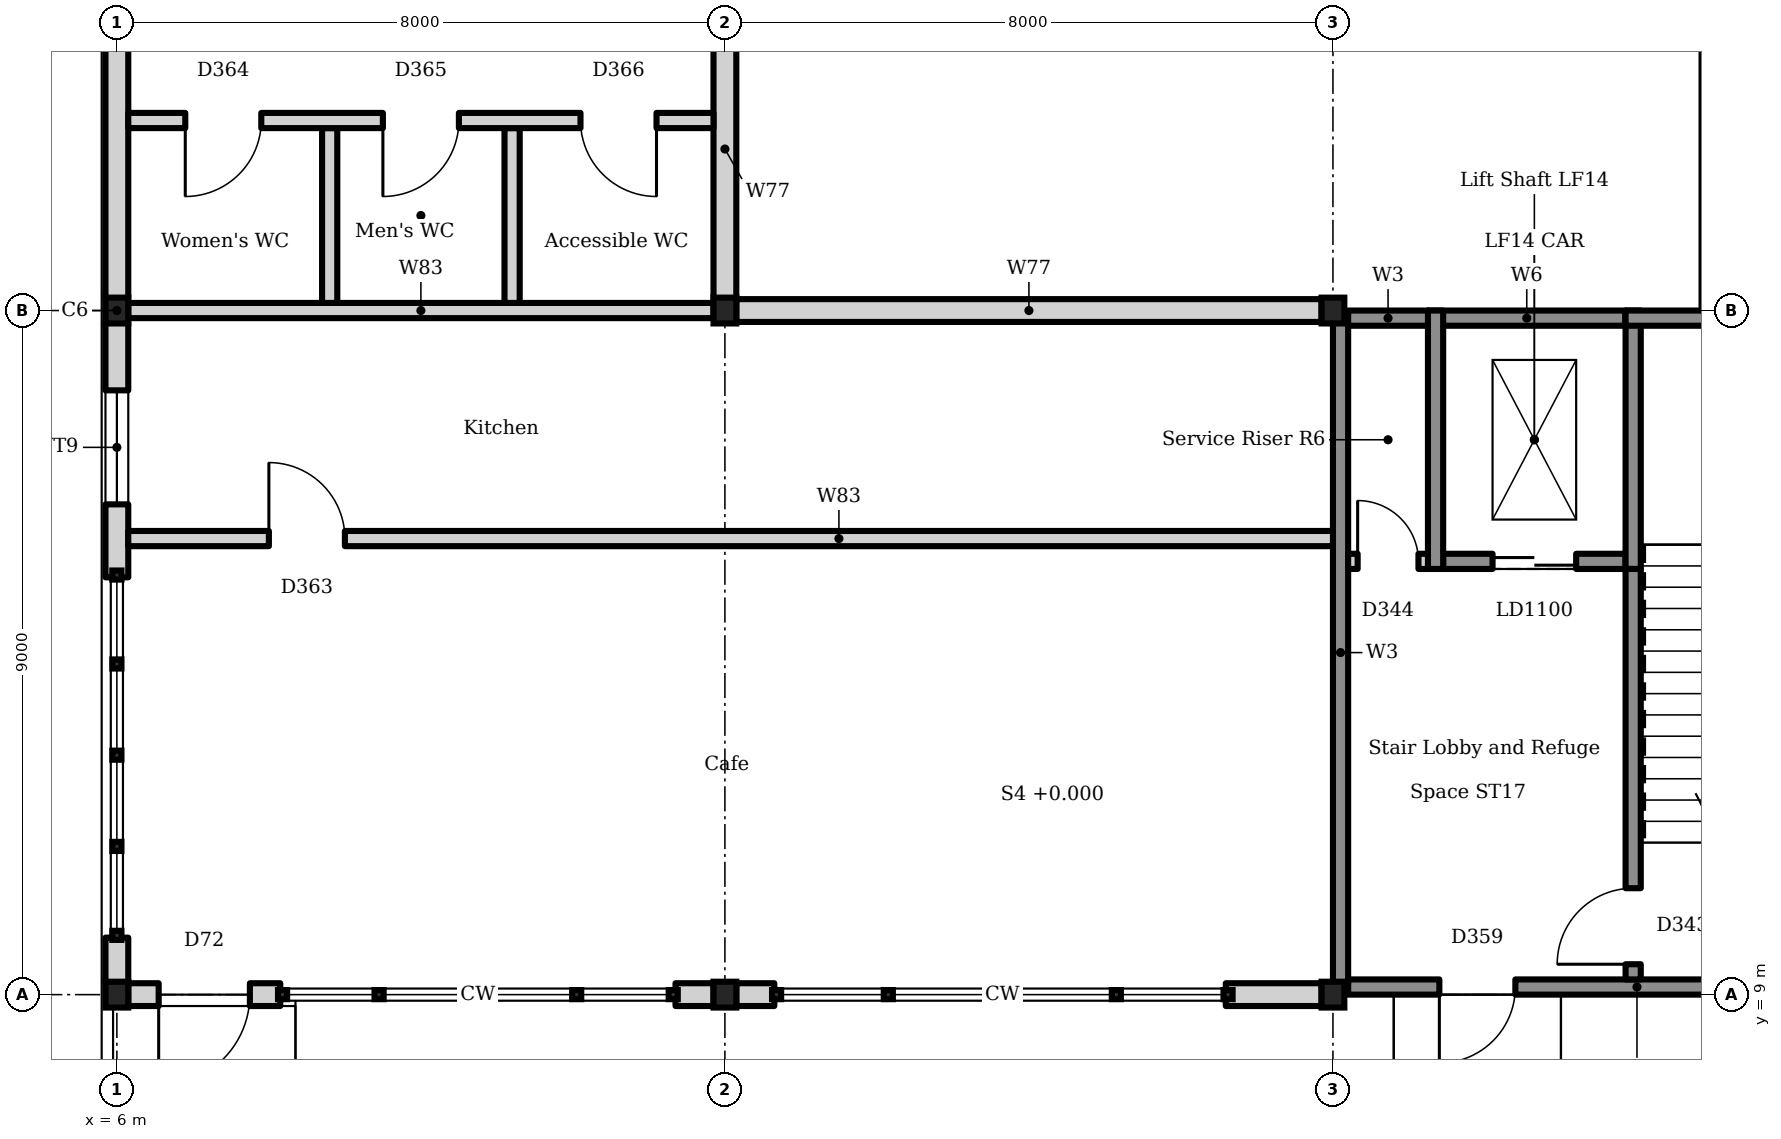
"""IFC4 building model, lengths in metres.
Left out: names, types, materials, properties, quantities, classifications, styles, units other than length and angle.
Written with IfcOpenShell. Run it as: python <this file> out.ifc"""

import sys

from ifc_helpers import new_model, si_unit, direction, frame, frame_2d, origin, origin_2d, place, context, subcontext, project, spatial, rectangle, i_section, extrude, element, fill, save


model = new_model("IFC4")
c1 = context("Model", 3, precision=1e-05, world=origin(), true_north=direction((0.0, 1.0)))
c2 = subcontext(c1, "Body", "Model", "MODEL_VIEW")
j1 = project(units=[si_unit("LENGTHUNIT", "METRE"), si_unit("PLANEANGLEUNIT", "RADIAN")], contexts=[c1])
p1 = place(None, origin())
s1 = spatial("IfcSite", under=j1, at=p1, CompositionType="ELEMENT")
p2 = place(p1, origin())
s2 = spatial("IfcBuilding", under=s1, at=p2, CompositionType="ELEMENT")
p3 = place(p2, origin())
s3 = spatial("IfcBuildingStorey", under=s2, at=p3, CompositionType="ELEMENT", Elevation=0.0)
p4 = place(p3, frame((23.25, 17.9, -1.1), z_axis=(0.0, 0.0, 1.0), x_axis=(1.0, 0.0, 0.0)))
e1 = element("IfcWall", 1, at=p4, inside=s3, PredefinedType="SOLIDWALL", context=c2, shape_type="SweptSolid", body=[
    extrude(rectangle(XDim=2.6, YDim=0.2, at=frame_2d((1.3, 0.0))), origin(), (0.0, 0.0, 1.0), 6.5),
])
p5 = place(p3, frame((23.45, 14.7, -1.1), z_axis=(0.0, 0.0, 1.0), x_axis=(1.0, 0.0, 0.0)))
e2 = element("IfcWall", 2, at=p5, inside=s3, PredefinedType="SOLIDWALL", context=c2, shape_type="SweptSolid", body=[
    extrude(rectangle(XDim=2.4, YDim=0.2, at=frame_2d((1.2, 0.0))), origin(), (0.0, 0.0, 1.0), 6.5),
])
p6 = place(p5, frame((0.65, 0.0, 1.1)))
e3 = element("IfcOpeningElement", 3, at=p6, cuts=e2, PredefinedType="OPENING", context=c2, shape_type="SweptSolid", body=[
    extrude(rectangle(XDim=1.1, YDim=2.1, at=frame_2d((0.55, 1.05))), frame((0.0, 0.11, 0.0), z_axis=(0.0, -1.0, 0.0), x_axis=(1.0, 0.0, 0.0)), (0.0, 0.0, 1.0), 0.22),
])
for number, where, z_axis, x_axis in (
    (4, (23.35, 14.6, -1.1), (0.0, 0.0, 1.0), (0.0, 1.0, 0.0)),
    (5, (25.95, 14.6, -1.1), (0.0, 0.0, 1.0), (0.0, 1.0, 0.0)),
):
    element("IfcWall", number, at=place(p3, frame(where, z_axis=z_axis, x_axis=x_axis)), inside=s3, PredefinedType="SOLIDWALL", context=c2, shape_type="SweptSolid", body=[
        extrude(rectangle(XDim=3.4, YDim=0.2, at=frame_2d((1.7, 0.0))), origin(), (0.0, 0.0, 1.0), 6.5),
    ])
for number, where, z_axis, x_axis in (
    (6, (6.0, 9.0, 0.0), (0.0, 0.0, 1.0), (1.0, 0.0, 0.0)),
    (7, (6.0, 18.0, 0.0), (0.0, 0.0, 1.0), (1.0, 0.0, 0.0)),
    (8, (14.0, 9.0, 0.0), (0.0, 0.0, 1.0), (1.0, 0.0, 0.0)),
    (9, (14.0, 18.0, 0.0), (0.0, 0.0, 1.0), (1.0, 0.0, 0.0)),
    (10, (22.0, 9.0, 0.0), (0.0, 0.0, 1.0), (1.0, 0.0, 0.0)),
    (11, (22.0, 18.0, 0.0), (0.0, 0.0, 1.0), (1.0, 0.0, 0.0)),
):
    element("IfcColumn", number, at=place(p3, frame(where, z_axis=z_axis, x_axis=x_axis)), inside=s3, PredefinedType="COLUMN", context=c2, shape_type="SweptSolid", body=[
        extrude(i_section(OverallWidth=0.3, OverallDepth=0.34, WebThickness=0.012, FlangeThickness=0.021, FilletRadius=0.027, at=origin_2d()), origin(), (0.0, 0.0, 1.0), 5.4),
    ])
p7 = place(p3, frame((6.15, 9.0, 0.0), z_axis=(0.0, 0.0, 1.0), x_axis=(1.0, 0.0, 0.0)))
e12 = element("IfcWall", 12, at=p7, inside=s3, PredefinedType="SOLIDWALL", context=c2, shape_type="SweptSolid", body=[
    extrude(rectangle(XDim=2.0, YDim=0.3, at=frame_2d((1.0, 0.0))), origin(), (0.0, 0.0, 1.0), 4.72),
])
p8 = place(p7, frame((0.4, 0.0, 0.0)))
e13 = element("IfcOpeningElement", 13, at=p8, cuts=e12, PredefinedType="OPENING", context=c2, shape_type="SweptSolid", body=[
    extrude(rectangle(XDim=1.2, YDim=2.4, at=frame_2d((0.6, 1.2))), frame((0.0, 0.16, 0.0), z_axis=(0.0, -1.0, 0.0), x_axis=(1.0, 0.0, 0.0)), (0.0, 0.0, 1.0), 0.32),
])
for number, where, z_axis, x_axis in (
    (14, (13.35, 9.0, 0.0), (0.0, 0.0, 1.0), (1.0, 0.0, 0.0)),
    (15, (14.15, 9.0, 0.0), (0.0, 0.0, 1.0), (1.0, 0.0, 0.0)),
):
    element("IfcWall", number, at=place(p3, frame(where, z_axis=z_axis, x_axis=x_axis)), inside=s3, PredefinedType="SOLIDWALL", context=c2, shape_type="SweptSolid", body=[
        extrude(rectangle(XDim=0.5, YDim=0.3, at=frame_2d((0.25, 0.0))), origin(), (0.0, 0.0, 1.0), 4.72),
    ])
p9 = place(p3, frame((20.59, 9.0, 0.0), z_axis=(0.0, 0.0, 1.0), x_axis=(1.0, 0.0, 0.0)))
e16 = element("IfcWall", 16, at=p9, inside=s3, PredefinedType="SOLIDWALL", context=c2, shape_type="SweptSolid", body=[
    extrude(rectangle(XDim=1.26, YDim=0.3, at=frame_2d((0.63, 0.0))), origin(), (0.0, 0.0, 1.0), 4.72),
])
p10 = place(p3, frame((6.0, 9.15, 0.0), z_axis=(0.0, 0.0, 1.0), x_axis=(0.0, 1.0, 0.0)))
e17 = element("IfcWall", 17, at=p10, inside=s3, PredefinedType="SOLIDWALL", context=c2, shape_type="SweptSolid", body=[
    extrude(rectangle(XDim=0.6, YDim=0.3, at=frame_2d((0.3, 0.0))), origin(), (0.0, 0.0, 1.0), 4.72),
])
p11 = place(p3, frame((6.0, 14.49, 0.0), z_axis=(0.0, 0.0, 1.0), x_axis=(0.0, 1.0, 0.0)))
e18 = element("IfcWall", 18, at=p11, inside=s3, PredefinedType="SOLIDWALL", context=c2, shape_type="SweptSolid", body=[
    extrude(rectangle(XDim=3.36, YDim=0.3, at=frame_2d((1.68, 0.0))), origin(), (0.0, 0.0, 1.0), 4.72),
])
p12 = place(p11, frame((0.96, 0.0, 0.9)))
e19 = element("IfcOpeningElement", 19, at=p12, cuts=e18, PredefinedType="OPENING", context=c2, shape_type="SweptSolid", body=[
    extrude(rectangle(XDim=1.5, YDim=2.8, at=frame_2d((0.75, 1.4))), frame((0.0, 0.16, 0.0), z_axis=(0.0, -1.0, 0.0), x_axis=(1.0, 0.0, 0.0)), (0.0, 0.0, 1.0), 0.32),
])
p13 = place(p3, frame((6.0, 18.15, 0.0), z_axis=(0.0, 0.0, 1.0), x_axis=(0.0, 1.0, 0.0)))
e20 = element("IfcWall", 20, at=p13, inside=s3, PredefinedType="SOLIDWALL", context=c2, shape_type="SweptSolid", body=[
    extrude(rectangle(XDim=8.7, YDim=0.3, at=frame_2d((4.35, 0.0))), origin(), (0.0, 0.0, 1.0), 4.72),
])
p14 = place(p13, frame((3.45, 0.0, 0.0)))
e21 = element("IfcOpeningElement", 21, at=p14, cuts=e20, PredefinedType="OPENING", context=c2, shape_type="SweptSolid", body=[
    extrude(rectangle(XDim=1.8, YDim=2.4, at=frame_2d((0.9, 1.2))), frame((0.0, 0.16, 0.0), z_axis=(0.0, -1.0, 0.0), x_axis=(1.0, 0.0, 0.0)), (0.0, 0.0, 1.0), 0.32),
])
p15 = place(p13, frame((6.3, 0.0, 0.9)))
e22 = element("IfcOpeningElement", 22, at=p15, cuts=e20, PredefinedType="OPENING", context=c2, shape_type="SweptSolid", body=[
    extrude(rectangle(XDim=1.5, YDim=2.8, at=frame_2d((0.75, 1.4))), frame((0.0, 0.16, 0.0), z_axis=(0.0, -1.0, 0.0), x_axis=(1.0, 0.0, 0.0)), (0.0, 0.0, 1.0), 0.32),
])
p16 = place(p3, frame((14.0, 18.15, 0.0), z_axis=(0.0, 0.0, 1.0), x_axis=(0.0, 1.0, 0.0)))
e23 = element("IfcWall", 23, at=p16, inside=s3, PredefinedType="SOLIDWALL", context=c2, shape_type="SweptSolid", body=[
    extrude(rectangle(XDim=8.7, YDim=0.3, at=frame_2d((4.35, 0.0))), origin(), (0.0, 0.0, 1.0), 4.72),
])
p17 = place(p16, frame((3.95, 0.0, 0.0)))
e24 = element("IfcOpeningElement", 24, at=p17, cuts=e23, PredefinedType="OPENING", context=c2, shape_type="SweptSolid", body=[
    extrude(rectangle(XDim=1.8, YDim=2.1, at=frame_2d((0.9, 1.05))), frame((0.0, 0.16, 0.0), z_axis=(0.0, -1.0, 0.0), x_axis=(1.0, 0.0, 0.0)), (0.0, 0.0, 1.0), 0.32),
])
p18 = place(p3, frame((14.15, 18.0, 0.0), z_axis=(0.0, 0.0, 1.0), x_axis=(1.0, 0.0, 0.0)))
e25 = element("IfcWall", 25, at=p18, inside=s3, PredefinedType="SOLIDWALL", context=c2, shape_type="SweptSolid", body=[
    extrude(rectangle(XDim=7.7, YDim=0.3, at=frame_2d((3.85, 0.0))), origin(), (0.0, 0.0, 1.0), 4.72),
])
p19 = place(p3, frame((27.0, 18.0, 0.0), z_axis=(0.0, 0.0, 1.0), x_axis=(0.0, 1.0, 0.0)))
e26 = element("IfcWall", 26, at=p19, inside=s3, PredefinedType="SOLIDWALL", context=c2, shape_type="SweptSolid", body=[
    extrude(rectangle(XDim=17.85, YDim=0.3, at=frame_2d((8.925, 0.0))), origin(), (0.0, 0.0, 1.0), 5.2),
])
p20 = place(p19, frame((4.1, 0.0, 0.0)))
e27 = element("IfcOpeningElement", 27, at=p20, cuts=e26, PredefinedType="OPENING", context=c2, shape_type="SweptSolid", body=[
    extrude(rectangle(XDim=1.8, YDim=2.1, at=frame_2d((0.9, 1.05))), frame((0.0, 0.16, 0.0), z_axis=(0.0, -1.0, 0.0), x_axis=(1.0, 0.0, 0.0)), (0.0, 0.0, 1.0), 0.32),
])
p21 = place(p3, frame((22.2, 9.1, 0.0), z_axis=(0.0, 0.0, 1.0), x_axis=(1.0, 0.0, 0.0)))
e28 = element("IfcWall", 28, at=p21, inside=s3, PredefinedType="SOLIDWALL", context=c2, shape_type="SweptSolid", body=[
    extrude(rectangle(XDim=7.79, YDim=0.2, at=frame_2d((3.895, 0.0))), origin(), (0.0, 0.0, 1.0), 5.2),
])
p22 = place(p21, frame((1.2, 0.0, 0.0)))
e29 = element("IfcOpeningElement", 29, at=p22, cuts=e28, PredefinedType="OPENING", context=c2, shape_type="SweptSolid", body=[
    extrude(rectangle(XDim=1.0, YDim=2.1, at=frame_2d((0.5, 1.05))), frame((0.0, 0.11, 0.0), z_axis=(0.0, -1.0, 0.0), x_axis=(1.0, 0.0, 0.0)), (0.0, 0.0, 1.0), 0.22),
])
p23 = place(p21, frame((5.4, 0.0, 0.0)))
e30 = element("IfcOpeningElement", 30, at=p23, cuts=e28, PredefinedType="OPENING", context=c2, shape_type="SweptSolid", body=[
    extrude(rectangle(XDim=1.0, YDim=2.1, at=frame_2d((0.5, 1.05))), frame((0.0, 0.11, 0.0), z_axis=(0.0, -1.0, 0.0), x_axis=(1.0, 0.0, 0.0)), (0.0, 0.0, 1.0), 0.22),
])
p24 = place(p3, frame((22.1, 9.15, 0.0), z_axis=(0.0, 0.0, 1.0), x_axis=(0.0, 1.0, 0.0)))
e31 = element("IfcWall", 31, at=p24, inside=s3, PredefinedType="SOLIDWALL", context=c2, shape_type="SweptSolid", body=[
    extrude(rectangle(XDim=8.7, YDim=0.2, at=frame_2d((4.35, 0.0))), origin(), (0.0, 0.0, 1.0), 5.2),
])
p25 = place(p3, frame((22.2, 17.9, 0.0), z_axis=(0.0, 0.0, 1.0), x_axis=(1.0, 0.0, 0.0)))
e32 = element("IfcWall", 32, at=p25, inside=s3, PredefinedType="SOLIDWALL", context=c2, shape_type="SweptSolid", body=[
    extrude(rectangle(XDim=1.05, YDim=0.2, at=frame_2d((0.525, 0.0))), origin(), (0.0, 0.0, 1.0), 5.2),
])
p26 = place(p3, frame((25.85, 17.9, 0.0), z_axis=(0.0, 0.0, 1.0), x_axis=(1.0, 0.0, 0.0)))
e33 = element("IfcWall", 33, at=p26, inside=s3, PredefinedType="SOLIDWALL", context=c2, shape_type="SweptSolid", body=[
    extrude(rectangle(XDim=3.95, YDim=0.2, at=frame_2d((1.975, 0.0))), origin(), (0.0, 0.0, 1.0), 5.2),
])
p27 = place(p3, frame((25.95, 9.2, 0.0), z_axis=(0.0, 0.0, 1.0), x_axis=(0.0, 1.0, 0.0)))
e34 = element("IfcWall", 34, at=p27, inside=s3, PredefinedType="SOLIDWALL", context=c2, shape_type="SweptSolid", body=[
    extrude(rectangle(XDim=5.4, YDim=0.2, at=frame_2d((2.7, 0.0))), origin(), (0.0, 0.0, 1.0), 5.2),
])
p28 = place(p27, frame((0.2, 0.0, 0.0)))
e35 = element("IfcOpeningElement", 35, at=p28, cuts=e34, PredefinedType="OPENING", context=c2, shape_type="SweptSolid", body=[
    extrude(rectangle(XDim=1.0, YDim=2.1, at=frame_2d((0.5, 1.05))), frame((0.0, 0.11, 0.0), z_axis=(0.0, -1.0, 0.0), x_axis=(1.0, 0.0, 0.0)), (0.0, 0.0, 1.0), 0.22),
])
p29 = place(p3, frame((22.2, 14.7, 0.0), z_axis=(0.0, 0.0, 1.0), x_axis=(1.0, 0.0, 0.0)))
e36 = element("IfcWall", 36, at=p29, inside=s3, PredefinedType="SOLIDWALL", context=c2, shape_type="SweptSolid", body=[
    extrude(rectangle(XDim=1.05, YDim=0.2, at=frame_2d((0.525, 0.0))), origin(), (0.0, 0.0, 1.0), 5.2),
])
p30 = place(p29, frame((0.125, 0.0, 0.0)))
e37 = element("IfcOpeningElement", 37, at=p30, cuts=e36, PredefinedType="OPENING", context=c2, shape_type="SweptSolid", body=[
    extrude(rectangle(XDim=0.8, YDim=2.1, at=frame_2d((0.4, 1.05))), frame((0.0, 0.11, 0.0), z_axis=(0.0, -1.0, 0.0), x_axis=(1.0, 0.0, 0.0)), (0.0, 0.0, 1.0), 0.22),
])
p31 = place(p3, frame((6.15, 15.0, 0.0), z_axis=(0.0, 0.0, 1.0), x_axis=(1.0, 0.0, 0.0)))
e38 = element("IfcWall", 38, at=p31, inside=s3, PredefinedType="PARTITIONING", context=c2, shape_type="SweptSolid", body=[
    extrude(rectangle(XDim=15.85, YDim=0.2, at=frame_2d((7.925, 0.0))), origin(), (0.0, 0.0, 1.0), 5.2),
])
p32 = place(p31, frame((1.85, 0.0, 0.0)))
e39 = element("IfcOpeningElement", 39, at=p32, cuts=e38, PredefinedType="OPENING", context=c2, shape_type="SweptSolid", body=[
    extrude(rectangle(XDim=1.0, YDim=2.1, at=frame_2d((0.5, 1.05))), frame((0.0, 0.11, 0.0), z_axis=(0.0, -1.0, 0.0), x_axis=(1.0, 0.0, 0.0)), (0.0, 0.0, 1.0), 0.22),
])
p33 = place(p3, frame((6.15, 18.0, 0.0), z_axis=(0.0, 0.0, 1.0), x_axis=(1.0, 0.0, 0.0)))
e40 = element("IfcWall", 40, at=p33, inside=s3, PredefinedType="PARTITIONING", context=c2, shape_type="SweptSolid", body=[
    extrude(rectangle(XDim=7.7, YDim=0.2, at=frame_2d((3.85, 0.0))), origin(), (0.0, 0.0, 1.0), 4.72),
])
for number, where, z_axis, x_axis in (
    (41, (8.8, 18.1, 0.0), (0.0, 0.0, 1.0), (0.0, 1.0, 0.0)),
    (42, (11.2, 18.1, 0.0), (0.0, 0.0, 1.0), (0.0, 1.0, 0.0)),
):
    element("IfcWall", number, at=place(p3, frame(where, z_axis=z_axis, x_axis=x_axis)), inside=s3, PredefinedType="PARTITIONING", context=c2, shape_type="SweptSolid", body=[
        extrude(rectangle(XDim=2.3, YDim=0.2, at=frame_2d((1.15, 0.0))), origin(), (0.0, 0.0, 1.0), 5.2),
    ])
p34 = place(p3, frame((6.15, 20.5, 0.0), z_axis=(0.0, 0.0, 1.0), x_axis=(1.0, 0.0, 0.0)))
e43 = element("IfcWall", 43, at=p34, inside=s3, PredefinedType="PARTITIONING", context=c2, shape_type="SweptSolid", body=[
    extrude(rectangle(XDim=7.7, YDim=0.2, at=frame_2d((3.85, 0.0))), origin(), (0.0, 0.0, 1.0), 5.2),
])
p35 = place(p34, frame((0.75, 0.0, 0.0)))
e44 = element("IfcOpeningElement", 44, at=p35, cuts=e43, PredefinedType="OPENING", context=c2, shape_type="SweptSolid", body=[
    extrude(rectangle(XDim=1.0, YDim=2.1, at=frame_2d((0.5, 1.05))), frame((0.0, 0.11, 0.0), z_axis=(0.0, -1.0, 0.0), x_axis=(1.0, 0.0, 0.0)), (0.0, 0.0, 1.0), 0.22),
])
p36 = place(p34, frame((3.35, 0.0, 0.0)))
e45 = element("IfcOpeningElement", 45, at=p36, cuts=e43, PredefinedType="OPENING", context=c2, shape_type="SweptSolid", body=[
    extrude(rectangle(XDim=1.0, YDim=2.1, at=frame_2d((0.5, 1.05))), frame((0.0, 0.11, 0.0), z_axis=(0.0, -1.0, 0.0), x_axis=(1.0, 0.0, 0.0)), (0.0, 0.0, 1.0), 0.22),
])
p37 = place(p34, frame((5.95, 0.0, 0.0)))
e46 = element("IfcOpeningElement", 46, at=p37, cuts=e43, PredefinedType="OPENING", context=c2, shape_type="SweptSolid", body=[
    extrude(rectangle(XDim=1.0, YDim=2.1, at=frame_2d((0.5, 1.05))), frame((0.0, 0.11, 0.0), z_axis=(0.0, -1.0, 0.0), x_axis=(1.0, 0.0, 0.0)), (0.0, 0.0, 1.0), 0.22),
])
p38 = place(p6, origin())
e47 = element("IfcDoor", 47, at=p38, inside=s3, OperationType="SLIDING_TO_LEFT", PredefinedType="DOOR", context=c2, shape_type="SweptSolid", body=[
    extrude(rectangle(XDim=1.1, YDim=2.1, at=frame_2d((0.55, 1.05))), frame((0.0, 0.025, 0.0), z_axis=(0.0, -1.0, 0.0), x_axis=(1.0, 0.0, 0.0)), (0.0, 0.0, 1.0), 0.05),
])
fill(e3, e47)
p39 = place(p8, frame((1.2, 0.0, 0.0), z_axis=(0.0, 0.0, 1.0), x_axis=(-1.0, 0.0, 0.0)))
e48 = element("IfcDoor", 48, at=p39, inside=s3, OperationType="SINGLE_SWING_LEFT", PredefinedType="DOOR", context=c2, shape_type="SweptSolid", body=[
    extrude(rectangle(XDim=1.2, YDim=2.4, at=frame_2d((0.6, 1.2))), frame((0.0, 0.025, 0.0), z_axis=(0.0, -1.0, 0.0), x_axis=(1.0, 0.0, 0.0)), (0.0, 0.0, 1.0), 0.05),
])
fill(e13, e48)
p40 = place(p12, origin())
e49 = element("IfcWindow", 49, at=p40, inside=s3, PartitioningType="SINGLE_PANEL", PredefinedType="WINDOW", context=c2, shape_type="SweptSolid", body=[
    extrude(rectangle(XDim=1.5, YDim=2.8, at=frame_2d((0.75, 1.4))), frame((0.0, 0.03, 0.0), z_axis=(0.0, -1.0, 0.0), x_axis=(1.0, 0.0, 0.0)), (0.0, 0.0, 1.0), 0.06),
])
fill(e19, e49)
p41 = place(p28, origin())
e50 = element("IfcDoor", 50, at=p41, inside=s3, OperationType="SINGLE_SWING_RIGHT", PredefinedType="DOOR", context=c2, shape_type="SweptSolid", body=[
    extrude(rectangle(XDim=1.0, YDim=2.1, at=frame_2d((0.5, 1.05))), frame((0.0, 0.025, 0.0), z_axis=(0.0, -1.0, 0.0), x_axis=(1.0, 0.0, 0.0)), (0.0, 0.0, 1.0), 0.05),
])
fill(e35, e50)
p42 = place(p30, origin())
e51 = element("IfcDoor", 51, at=p42, inside=s3, OperationType="SINGLE_SWING_RIGHT", PredefinedType="DOOR", context=c2, shape_type="SweptSolid", body=[
    extrude(rectangle(XDim=0.8, YDim=2.1, at=frame_2d((0.4, 1.05))), frame((0.0, 0.025, 0.0), z_axis=(0.0, -1.0, 0.0), x_axis=(1.0, 0.0, 0.0)), (0.0, 0.0, 1.0), 0.05),
])
fill(e37, e51)
p43 = place(p22, frame((1.0, 0.0, 0.0), z_axis=(0.0, 0.0, 1.0), x_axis=(-1.0, 0.0, 0.0)))
e52 = element("IfcDoor", 52, at=p43, inside=s3, OperationType="SINGLE_SWING_LEFT", PredefinedType="DOOR", context=c2, shape_type="SweptSolid", body=[
    extrude(rectangle(XDim=1.0, YDim=2.1, at=frame_2d((0.5, 1.05))), frame((0.0, 0.025, 0.0), z_axis=(0.0, -1.0, 0.0), x_axis=(1.0, 0.0, 0.0)), (0.0, 0.0, 1.0), 0.05),
])
fill(e29, e52)
p44 = place(p32, origin())
e53 = element("IfcDoor", 53, at=p44, inside=s3, OperationType="SINGLE_SWING_RIGHT", PredefinedType="DOOR", context=c2, shape_type="SweptSolid", body=[
    extrude(rectangle(XDim=1.0, YDim=2.1, at=frame_2d((0.5, 1.05))), frame((0.0, 0.025, 0.0), z_axis=(0.0, -1.0, 0.0), x_axis=(1.0, 0.0, 0.0)), (0.0, 0.0, 1.0), 0.05),
])
fill(e39, e53)
p45 = place(p35, frame((1.0, 0.0, 0.0), z_axis=(0.0, 0.0, 1.0), x_axis=(-1.0, 0.0, 0.0)))
e54 = element("IfcDoor", 54, at=p45, inside=s3, OperationType="SINGLE_SWING_LEFT", PredefinedType="DOOR", context=c2, shape_type="SweptSolid", body=[
    extrude(rectangle(XDim=1.0, YDim=2.1, at=frame_2d((0.5, 1.05))), frame((0.0, 0.025, 0.0), z_axis=(0.0, -1.0, 0.0), x_axis=(1.0, 0.0, 0.0)), (0.0, 0.0, 1.0), 0.05),
])
fill(e44, e54)
p46 = place(p36, frame((1.0, 0.0, 0.0), z_axis=(0.0, 0.0, 1.0), x_axis=(-1.0, 0.0, 0.0)))
e55 = element("IfcDoor", 55, at=p46, inside=s3, OperationType="SINGLE_SWING_LEFT", PredefinedType="DOOR", context=c2, shape_type="SweptSolid", body=[
    extrude(rectangle(XDim=1.0, YDim=2.1, at=frame_2d((0.5, 1.05))), frame((0.0, 0.025, 0.0), z_axis=(0.0, -1.0, 0.0), x_axis=(1.0, 0.0, 0.0)), (0.0, 0.0, 1.0), 0.05),
])
fill(e45, e55)
p47 = place(p37, frame((1.0, 0.0, 0.0), z_axis=(0.0, 0.0, 1.0), x_axis=(-1.0, 0.0, 0.0)))
e56 = element("IfcDoor", 56, at=p47, inside=s3, OperationType="SINGLE_SWING_RIGHT", PredefinedType="DOOR", context=c2, shape_type="SweptSolid", body=[
    extrude(rectangle(XDim=1.0, YDim=2.1, at=frame_2d((0.5, 1.05))), frame((0.0, 0.025, 0.0), z_axis=(0.0, -1.0, 0.0), x_axis=(1.0, 0.0, 0.0)), (0.0, 0.0, 1.0), 0.05),
])
fill(e46, e56)
save(model, sys.argv[1])
